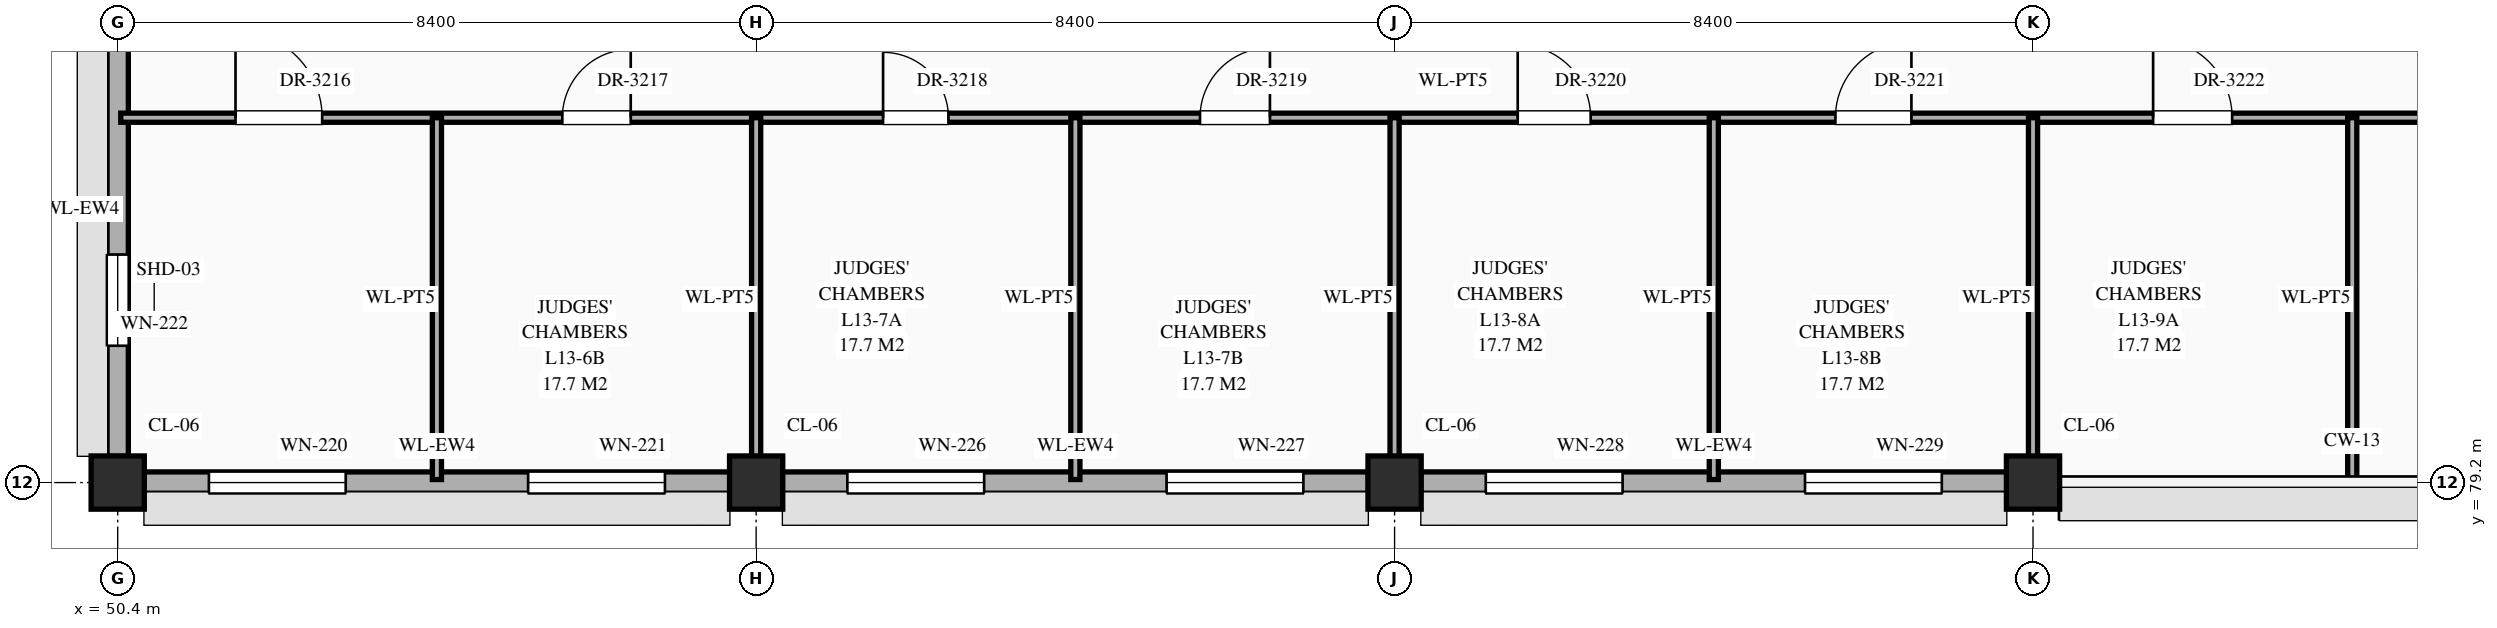
"""IFC4 building model, lengths in metres.
Left out: names, types, materials, properties, quantities, classifications, styles, units other than length and angle.
Written with IfcOpenShell. Run it as: python <this file> out.ifc"""

import sys

from ifc_helpers import new_model, si_unit, direction, frame, frame_2d, origin, origin_2d, place, context, subcontext, project, spatial, rectangle, extrude, element, fill, save


model = new_model("IFC4")
c1 = context("Model", 3, precision=1e-05, world=origin(), true_north=direction((0.0, 1.0)))
c2 = subcontext(c1, "Body", "Model", "MODEL_VIEW")
j1 = project(units=[si_unit("LENGTHUNIT", "METRE"), si_unit("PLANEANGLEUNIT", "RADIAN")], contexts=[c1])
p1 = place(None, origin())
s1 = spatial("IfcSite", under=j1, at=p1, CompositionType="ELEMENT")
p2 = place(p1, origin())
s2 = spatial("IfcBuilding", under=s1, at=p2, CompositionType="ELEMENT")
p3 = place(p2, frame((0.0, 0.0, 56.1)))
s3 = spatial("IfcBuildingStorey", under=s2, at=p3, CompositionType="ELEMENT", Elevation=56.1)
for number, where, z_axis, x_axis in (
    (1, (50.4, 79.2, 0.0), (0.0, 0.0, 1.0), (1.0, 0.0, 0.0)),
    (2, (58.8, 79.2, 0.0), (0.0, 0.0, 1.0), (1.0, 0.0, 0.0)),
    (3, (67.2, 79.2, 0.0), (0.0, 0.0, 1.0), (1.0, 0.0, 0.0)),
    (4, (75.6, 79.2, 0.0), (0.0, 0.0, 1.0), (1.0, 0.0, 0.0)),
):
    element("IfcColumn", number, at=place(p3, frame(where, z_axis=z_axis, x_axis=x_axis)), inside=s3, PredefinedType="COLUMN", context=c2, shape_type="SweptSolid", body=[
        extrude(rectangle(XDim=0.7, YDim=0.7, at=origin_2d()), origin(), (0.0, 0.0, 1.0), 4.2),
    ])
p4 = place(p3, frame((50.745, 79.2, 0.0), z_axis=(0.0, 0.0, 1.0), x_axis=(1.0, 0.0, 0.0)))
e5 = element("IfcWall", 5, at=p4, inside=s3, PredefinedType="STANDARD", context=c2, shape_type="SweptSolid", body=[
    extrude(rectangle(XDim=7.71, YDim=0.28, at=frame_2d((3.855, 0.0))), origin(), (0.0, 0.0, 1.0), 3.2),
])
p5 = place(p4, frame((0.855, 0.0, 0.55)))
e6 = element("IfcOpeningElement", 6, at=p5, cuts=e5, PredefinedType="OPENING", context=c2, shape_type="SweptSolid", body=[
    extrude(rectangle(XDim=1.8, YDim=2.12, at=frame_2d((0.9, 1.06))), frame((0.0, 0.152, 0.0), z_axis=(0.0, -1.0, 0.0), x_axis=(1.0, 0.0, 0.0)), (0.0, 0.0, 1.0), 0.304),
])
p6 = place(p4, frame((5.055, 0.0, 0.55)))
e7 = element("IfcOpeningElement", 7, at=p6, cuts=e5, PredefinedType="OPENING", context=c2, shape_type="SweptSolid", body=[
    extrude(rectangle(XDim=1.8, YDim=2.12, at=frame_2d((0.9, 1.06))), frame((0.0, 0.152, 0.0), z_axis=(0.0, -1.0, 0.0), x_axis=(1.0, 0.0, 0.0)), (0.0, 0.0, 1.0), 0.304),
])
p7 = place(p3, frame((50.4, 79.545, 0.0), z_axis=(0.0, 0.0, 1.0), x_axis=(0.0, 1.0, 0.0)))
e8 = element("IfcWall", 8, at=p7, inside=s3, PredefinedType="STANDARD", context=c2, shape_type="SweptSolid", body=[
    extrude(rectangle(XDim=6.51, YDim=0.28, at=frame_2d((3.255, 0.0))), origin(), (0.0, 0.0, 1.0), 3.2),
])
p8 = place(p7, frame((1.455, 0.0, 0.55)))
e9 = element("IfcOpeningElement", 9, at=p8, cuts=e8, PredefinedType="OPENING", context=c2, shape_type="SweptSolid", body=[
    extrude(rectangle(XDim=1.2, YDim=1.56, at=frame_2d((0.6, 0.78))), frame((0.0, 0.152, 0.0), z_axis=(0.0, -1.0, 0.0), x_axis=(1.0, 0.0, 0.0)), (0.0, 0.0, 1.0), 0.304),
])
p9 = place(p3, frame((59.145, 79.2, 0.0), z_axis=(0.0, 0.0, 1.0), x_axis=(1.0, 0.0, 0.0)))
e10 = element("IfcWall", 10, at=p9, inside=s3, PredefinedType="STANDARD", context=c2, shape_type="SweptSolid", body=[
    extrude(rectangle(XDim=7.71, YDim=0.28, at=frame_2d((3.855, 0.0))), origin(), (0.0, 0.0, 1.0), 3.31),
])
p10 = place(p9, frame((0.855, 0.0, 0.55)))
e11 = element("IfcOpeningElement", 11, at=p10, cuts=e10, PredefinedType="OPENING", context=c2, shape_type="SweptSolid", body=[
    extrude(rectangle(XDim=1.8, YDim=2.12, at=frame_2d((0.9, 1.06))), frame((0.0, 0.152, 0.0), z_axis=(0.0, -1.0, 0.0), x_axis=(1.0, 0.0, 0.0)), (0.0, 0.0, 1.0), 0.304),
])
p11 = place(p9, frame((5.055, 0.0, 0.55)))
e12 = element("IfcOpeningElement", 12, at=p11, cuts=e10, PredefinedType="OPENING", context=c2, shape_type="SweptSolid", body=[
    extrude(rectangle(XDim=1.8, YDim=2.12, at=frame_2d((0.9, 1.06))), frame((0.0, 0.152, 0.0), z_axis=(0.0, -1.0, 0.0), x_axis=(1.0, 0.0, 0.0)), (0.0, 0.0, 1.0), 0.304),
])
p12 = place(p3, frame((67.545, 79.2, 0.0), z_axis=(0.0, 0.0, 1.0), x_axis=(1.0, 0.0, 0.0)))
e13 = element("IfcWall", 13, at=p12, inside=s3, PredefinedType="STANDARD", context=c2, shape_type="SweptSolid", body=[
    extrude(rectangle(XDim=7.71, YDim=0.28, at=frame_2d((3.855, 0.0))), origin(), (0.0, 0.0, 1.0), 3.31),
])
p13 = place(p12, frame((0.855, 0.0, 0.55)))
e14 = element("IfcOpeningElement", 14, at=p13, cuts=e13, PredefinedType="OPENING", context=c2, shape_type="SweptSolid", body=[
    extrude(rectangle(XDim=1.8, YDim=2.12, at=frame_2d((0.9, 1.06))), frame((0.0, 0.152, 0.0), z_axis=(0.0, -1.0, 0.0), x_axis=(1.0, 0.0, 0.0)), (0.0, 0.0, 1.0), 0.304),
])
p14 = place(p12, frame((5.055, 0.0, 0.55)))
e15 = element("IfcOpeningElement", 15, at=p14, cuts=e13, PredefinedType="OPENING", context=c2, shape_type="SweptSolid", body=[
    extrude(rectangle(XDim=1.8, YDim=2.12, at=frame_2d((0.9, 1.06))), frame((0.0, 0.152, 0.0), z_axis=(0.0, -1.0, 0.0), x_axis=(1.0, 0.0, 0.0)), (0.0, 0.0, 1.0), 0.304),
])
p15 = place(p3, frame((50.44, 84.0, 0.0), z_axis=(0.0, 0.0, 1.0), x_axis=(1.0, 0.0, 0.0)))
e16 = element("IfcWall", 16, at=p15, inside=s3, PredefinedType="STANDARD", context=c2, shape_type="SweptSolid", body=[
    extrude(rectangle(XDim=67.12, YDim=0.12, at=frame_2d((33.56, 0.0))), origin(), (0.0, 0.0, 1.0), 3.96),
])
p16 = place(p15, frame((1.51, 0.0, 0.0)))
e17 = element("IfcOpeningElement", 17, at=p16, cuts=e16, PredefinedType="OPENING", context=c2, shape_type="SweptSolid", body=[
    extrude(rectangle(XDim=1.14, YDim=2.4, at=frame_2d((0.57, 1.2))), frame((0.0, 0.072, 0.0), z_axis=(0.0, -1.0, 0.0), x_axis=(1.0, 0.0, 0.0)), (0.0, 0.0, 1.0), 0.144),
])
p17 = place(p15, frame((5.81, 0.0, 0.0)))
e18 = element("IfcOpeningElement", 18, at=p17, cuts=e16, PredefinedType="OPENING", context=c2, shape_type="SweptSolid", body=[
    extrude(rectangle(XDim=0.9, YDim=2.15, at=frame_2d((0.45, 1.075))), frame((0.0, 0.072, 0.0), z_axis=(0.0, -1.0, 0.0), x_axis=(1.0, 0.0, 0.0)), (0.0, 0.0, 1.0), 0.144),
])
p18 = place(p15, frame((10.03, 0.0, 0.0)))
e19 = element("IfcOpeningElement", 19, at=p18, cuts=e16, PredefinedType="OPENING", context=c2, shape_type="SweptSolid", body=[
    extrude(rectangle(XDim=0.86, YDim=2.1, at=frame_2d((0.43, 1.05))), frame((0.0, 0.072, 0.0), z_axis=(0.0, -1.0, 0.0), x_axis=(1.0, 0.0, 0.0)), (0.0, 0.0, 1.0), 0.144),
])
p19 = place(p15, frame((14.2, 0.0, 0.0)))
e20 = element("IfcOpeningElement", 20, at=p19, cuts=e16, PredefinedType="OPENING", context=c2, shape_type="SweptSolid", body=[
    extrude(rectangle(XDim=0.92, YDim=2.15, at=frame_2d((0.46, 1.075))), frame((0.0, 0.072, 0.0), z_axis=(0.0, -1.0, 0.0), x_axis=(1.0, 0.0, 0.0)), (0.0, 0.0, 1.0), 0.144),
])
p20 = place(p15, frame((18.38, 0.0, 0.0)))
e21 = element("IfcOpeningElement", 21, at=p20, cuts=e16, PredefinedType="OPENING", context=c2, shape_type="SweptSolid", body=[
    extrude(rectangle(XDim=0.96, YDim=2.2, at=frame_2d((0.48, 1.1))), frame((0.0, 0.072, 0.0), z_axis=(0.0, -1.0, 0.0), x_axis=(1.0, 0.0, 0.0)), (0.0, 0.0, 1.0), 0.144),
])
p21 = place(p15, frame((22.56, 0.0, 0.0)))
e22 = element("IfcOpeningElement", 22, at=p21, cuts=e16, PredefinedType="OPENING", context=c2, shape_type="SweptSolid", body=[
    extrude(rectangle(XDim=1.0, YDim=2.25, at=frame_2d((0.5, 1.125))), frame((0.0, 0.072, 0.0), z_axis=(0.0, -1.0, 0.0), x_axis=(1.0, 0.0, 0.0)), (0.0, 0.0, 1.0), 0.144),
])
p22 = place(p15, frame((26.74, 0.0, 0.0)))
e23 = element("IfcOpeningElement", 23, at=p22, cuts=e16, PredefinedType="OPENING", context=c2, shape_type="SweptSolid", body=[
    extrude(rectangle(XDim=1.04, YDim=2.2, at=frame_2d((0.52, 1.1))), frame((0.0, 0.072, 0.0), z_axis=(0.0, -1.0, 0.0), x_axis=(1.0, 0.0, 0.0)), (0.0, 0.0, 1.0), 0.144),
])
p23 = place(p15, frame((30.92, 0.0, 0.0)))
e24 = element("IfcOpeningElement", 24, at=p23, cuts=e16, PredefinedType="OPENING", context=c2, shape_type="SweptSolid", body=[
    extrude(rectangle(XDim=1.08, YDim=2.25, at=frame_2d((0.54, 1.125))), frame((0.0, 0.072, 0.0), z_axis=(0.0, -1.0, 0.0), x_axis=(1.0, 0.0, 0.0)), (0.0, 0.0, 1.0), 0.144),
])
p24 = place(p15, frame((35.1, 0.0, 0.0)))
e25 = element("IfcOpeningElement", 25, at=p24, cuts=e16, PredefinedType="OPENING", context=c2, shape_type="SweptSolid", body=[
    extrude(rectangle(XDim=1.12, YDim=2.25, at=frame_2d((0.56, 1.125))), frame((0.0, 0.072, 0.0), z_axis=(0.0, -1.0, 0.0), x_axis=(1.0, 0.0, 0.0)), (0.0, 0.0, 1.0), 0.144),
])
p25 = place(p15, frame((39.28, 0.0, 0.0)))
e26 = element("IfcOpeningElement", 26, at=p25, cuts=e16, PredefinedType="OPENING", context=c2, shape_type="SweptSolid", body=[
    extrude(rectangle(XDim=1.16, YDim=2.3, at=frame_2d((0.58, 1.15))), frame((0.0, 0.072, 0.0), z_axis=(0.0, -1.0, 0.0), x_axis=(1.0, 0.0, 0.0)), (0.0, 0.0, 1.0), 0.144),
])
p26 = place(p15, frame((43.46, 0.0, 0.0)))
e27 = element("IfcOpeningElement", 27, at=p26, cuts=e16, PredefinedType="OPENING", context=c2, shape_type="SweptSolid", body=[
    extrude(rectangle(XDim=1.2, YDim=2.35, at=frame_2d((0.6, 1.175))), frame((0.0, 0.072, 0.0), z_axis=(0.0, -1.0, 0.0), x_axis=(1.0, 0.0, 0.0)), (0.0, 0.0, 1.0), 0.144),
])
p27 = place(p15, frame((47.64, 0.0, 0.0)))
e28 = element("IfcOpeningElement", 28, at=p27, cuts=e16, PredefinedType="OPENING", context=c2, shape_type="SweptSolid", body=[
    extrude(rectangle(XDim=1.24, YDim=2.3, at=frame_2d((0.62, 1.15))), frame((0.0, 0.072, 0.0), z_axis=(0.0, -1.0, 0.0), x_axis=(1.0, 0.0, 0.0)), (0.0, 0.0, 1.0), 0.144),
])
p28 = place(p15, frame((51.82, 0.0, 0.0)))
e29 = element("IfcOpeningElement", 29, at=p28, cuts=e16, PredefinedType="OPENING", context=c2, shape_type="SweptSolid", body=[
    extrude(rectangle(XDim=1.28, YDim=2.35, at=frame_2d((0.64, 1.175))), frame((0.0, 0.072, 0.0), z_axis=(0.0, -1.0, 0.0), x_axis=(1.0, 0.0, 0.0)), (0.0, 0.0, 1.0), 0.144),
])
p29 = place(p15, frame((56.19, 0.0, 0.0)))
e30 = element("IfcOpeningElement", 30, at=p29, cuts=e16, PredefinedType="OPENING", context=c2, shape_type="SweptSolid", body=[
    extrude(rectangle(XDim=0.94, YDim=2.3, at=frame_2d((0.47, 1.15))), frame((0.0, 0.072, 0.0), z_axis=(0.0, -1.0, 0.0), x_axis=(1.0, 0.0, 0.0)), (0.0, 0.0, 1.0), 0.144),
])
p30 = place(p15, frame((60.37, 0.0, 0.0)))
e31 = element("IfcOpeningElement", 31, at=p30, cuts=e16, PredefinedType="OPENING", context=c2, shape_type="SweptSolid", body=[
    extrude(rectangle(XDim=0.98, YDim=2.35, at=frame_2d((0.49, 1.175))), frame((0.0, 0.072, 0.0), z_axis=(0.0, -1.0, 0.0), x_axis=(1.0, 0.0, 0.0)), (0.0, 0.0, 1.0), 0.144),
])
p31 = place(p15, frame((64.53, 0.0, 0.0)))
e32 = element("IfcOpeningElement", 32, at=p31, cuts=e16, PredefinedType="OPENING", context=c2, shape_type="SweptSolid", body=[
    extrude(rectangle(XDim=1.02, YDim=2.4, at=frame_2d((0.51, 1.2))), frame((0.0, 0.072, 0.0), z_axis=(0.0, -1.0, 0.0), x_axis=(1.0, 0.0, 0.0)), (0.0, 0.0, 1.0), 0.144),
])
p32 = place(p3, frame((54.6, 79.24, 0.0), z_axis=(0.0, 0.0, 1.0), x_axis=(0.0, 1.0, 0.0)))
e33 = element("IfcWall", 33, at=p32, inside=s3, PredefinedType="STANDARD", context=c2, shape_type="SweptSolid", body=[
    extrude(rectangle(XDim=4.76, YDim=0.12, at=frame_2d((2.38, 0.0))), origin(), (0.0, 0.0, 1.0), 3.85),
])
p33 = place(p3, frame((58.8, 79.24, 0.0), z_axis=(0.0, 0.0, 1.0), x_axis=(0.0, 1.0, 0.0)))
e34 = element("IfcWall", 34, at=p33, inside=s3, PredefinedType="STANDARD", context=c2, shape_type="SweptSolid", body=[
    extrude(rectangle(XDim=4.76, YDim=0.12, at=frame_2d((2.38, 0.0))), origin(), (0.0, 0.0, 1.0), 3.1),
])
p34 = place(p3, frame((63.0, 79.24, 0.0), z_axis=(0.0, 0.0, 1.0), x_axis=(0.0, 1.0, 0.0)))
e35 = element("IfcWall", 35, at=p34, inside=s3, PredefinedType="STANDARD", context=c2, shape_type="SweptSolid", body=[
    extrude(rectangle(XDim=4.76, YDim=0.12, at=frame_2d((2.38, 0.0))), origin(), (0.0, 0.0, 1.0), 3.61),
])
p35 = place(p3, frame((67.2, 79.24, 0.0), z_axis=(0.0, 0.0, 1.0), x_axis=(0.0, 1.0, 0.0)))
e36 = element("IfcWall", 36, at=p35, inside=s3, PredefinedType="STANDARD", context=c2, shape_type="SweptSolid", body=[
    extrude(rectangle(XDim=4.76, YDim=0.12, at=frame_2d((2.38, 0.0))), origin(), (0.0, 0.0, 1.0), 3.21),
])
p36 = place(p3, frame((71.4, 79.24, 0.0), z_axis=(0.0, 0.0, 1.0), x_axis=(0.0, 1.0, 0.0)))
e37 = element("IfcWall", 37, at=p36, inside=s3, PredefinedType="STANDARD", context=c2, shape_type="SweptSolid", body=[
    extrude(rectangle(XDim=4.76, YDim=0.12, at=frame_2d((2.38, 0.0))), origin(), (0.0, 0.0, 1.0), 3.96),
])
p37 = place(p3, frame((75.6, 79.24, 0.0), z_axis=(0.0, 0.0, 1.0), x_axis=(0.0, 1.0, 0.0)))
e38 = element("IfcWall", 38, at=p37, inside=s3, PredefinedType="STANDARD", context=c2, shape_type="SweptSolid", body=[
    extrude(rectangle(XDim=4.76, YDim=0.12, at=frame_2d((2.38, 0.0))), origin(), (0.0, 0.0, 1.0), 3.21),
])
p38 = place(p3, frame((79.8, 79.24, 0.0), z_axis=(0.0, 0.0, 1.0), x_axis=(0.0, 1.0, 0.0)))
e39 = element("IfcWall", 39, at=p38, inside=s3, PredefinedType="STANDARD", context=c2, shape_type="SweptSolid", body=[
    extrude(rectangle(XDim=4.76, YDim=0.12, at=frame_2d((2.38, 0.0))), origin(), (0.0, 0.0, 1.0), 3.61),
])
p39 = place(p5, origin())
e40 = element("IfcWindow", 40, at=p39, inside=s3, PartitioningType="SINGLE_PANEL", PredefinedType="WINDOW", context=c2, shape_type="SweptSolid", body=[
    extrude(rectangle(XDim=1.8, YDim=2.12, at=frame_2d((0.9, 1.06))), frame((0.0, 0.03, 0.0), z_axis=(0.0, -1.0, 0.0), x_axis=(1.0, 0.0, 0.0)), (0.0, 0.0, 1.0), 0.06),
])
fill(e6, e40)
p40 = place(p6, origin())
e41 = element("IfcWindow", 41, at=p40, inside=s3, PartitioningType="SINGLE_PANEL", PredefinedType="WINDOW", context=c2, shape_type="SweptSolid", body=[
    extrude(rectangle(XDim=1.8, YDim=2.12, at=frame_2d((0.9, 1.06))), frame((0.0, 0.03, 0.0), z_axis=(0.0, -1.0, 0.0), x_axis=(1.0, 0.0, 0.0)), (0.0, 0.0, 1.0), 0.06),
])
fill(e7, e41)
p41 = place(p8, origin())
e42 = element("IfcWindow", 42, at=p41, inside=s3, PartitioningType="SINGLE_PANEL", PredefinedType="WINDOW", context=c2, shape_type="SweptSolid", body=[
    extrude(rectangle(XDim=1.2, YDim=1.56, at=frame_2d((0.6, 0.78))), frame((0.0, 0.03, 0.0), z_axis=(0.0, -1.0, 0.0), x_axis=(1.0, 0.0, 0.0)), (0.0, 0.0, 1.0), 0.06),
])
fill(e9, e42)
p42 = place(p10, origin())
e43 = element("IfcWindow", 43, at=p42, inside=s3, PartitioningType="SINGLE_PANEL", PredefinedType="WINDOW", context=c2, shape_type="SweptSolid", body=[
    extrude(rectangle(XDim=1.8, YDim=2.12, at=frame_2d((0.9, 1.06))), frame((0.0, 0.03, 0.0), z_axis=(0.0, -1.0, 0.0), x_axis=(1.0, 0.0, 0.0)), (0.0, 0.0, 1.0), 0.06),
])
fill(e11, e43)
p43 = place(p11, origin())
e44 = element("IfcWindow", 44, at=p43, inside=s3, PartitioningType="SINGLE_PANEL", PredefinedType="WINDOW", context=c2, shape_type="SweptSolid", body=[
    extrude(rectangle(XDim=1.8, YDim=2.12, at=frame_2d((0.9, 1.06))), frame((0.0, 0.03, 0.0), z_axis=(0.0, -1.0, 0.0), x_axis=(1.0, 0.0, 0.0)), (0.0, 0.0, 1.0), 0.06),
])
fill(e12, e44)
p44 = place(p13, origin())
e45 = element("IfcWindow", 45, at=p44, inside=s3, PartitioningType="SINGLE_PANEL", PredefinedType="WINDOW", context=c2, shape_type="SweptSolid", body=[
    extrude(rectangle(XDim=1.8, YDim=2.12, at=frame_2d((0.9, 1.06))), frame((0.0, 0.03, 0.0), z_axis=(0.0, -1.0, 0.0), x_axis=(1.0, 0.0, 0.0)), (0.0, 0.0, 1.0), 0.06),
])
fill(e14, e45)
p45 = place(p14, origin())
e46 = element("IfcWindow", 46, at=p45, inside=s3, PartitioningType="SINGLE_PANEL", PredefinedType="WINDOW", context=c2, shape_type="SweptSolid", body=[
    extrude(rectangle(XDim=1.8, YDim=2.12, at=frame_2d((0.9, 1.06))), frame((0.0, 0.03, 0.0), z_axis=(0.0, -1.0, 0.0), x_axis=(1.0, 0.0, 0.0)), (0.0, 0.0, 1.0), 0.06),
])
fill(e15, e46)
p46 = place(p16, origin())
e47 = element("IfcDoor", 47, at=p46, inside=s3, OperationType="SINGLE_SWING_LEFT", PredefinedType="DOOR", context=c2, shape_type="SweptSolid", body=[
    extrude(rectangle(XDim=1.14, YDim=2.4, at=frame_2d((0.57, 1.2))), frame((0.0, 0.025, 0.0), z_axis=(0.0, -1.0, 0.0), x_axis=(1.0, 0.0, 0.0)), (0.0, 0.0, 1.0), 0.05),
])
fill(e17, e47)
p47 = place(p17, origin())
e48 = element("IfcDoor", 48, at=p47, inside=s3, OperationType="SINGLE_SWING_RIGHT", PredefinedType="DOOR", context=c2, shape_type="SweptSolid", body=[
    extrude(rectangle(XDim=0.9, YDim=2.15, at=frame_2d((0.45, 1.075))), frame((0.0, 0.025, 0.0), z_axis=(0.0, -1.0, 0.0), x_axis=(1.0, 0.0, 0.0)), (0.0, 0.0, 1.0), 0.05),
])
fill(e18, e48)
p48 = place(p18, origin())
e49 = element("IfcDoor", 49, at=p48, inside=s3, OperationType="SINGLE_SWING_LEFT", PredefinedType="DOOR", context=c2, shape_type="SweptSolid", body=[
    extrude(rectangle(XDim=0.86, YDim=2.1, at=frame_2d((0.43, 1.05))), frame((0.0, 0.025, 0.0), z_axis=(0.0, -1.0, 0.0), x_axis=(1.0, 0.0, 0.0)), (0.0, 0.0, 1.0), 0.05),
])
fill(e19, e49)
p49 = place(p19, origin())
e50 = element("IfcDoor", 50, at=p49, inside=s3, OperationType="SINGLE_SWING_RIGHT", PredefinedType="DOOR", context=c2, shape_type="SweptSolid", body=[
    extrude(rectangle(XDim=0.92, YDim=2.15, at=frame_2d((0.46, 1.075))), frame((0.0, 0.025, 0.0), z_axis=(0.0, -1.0, 0.0), x_axis=(1.0, 0.0, 0.0)), (0.0, 0.0, 1.0), 0.05),
])
fill(e20, e50)
p50 = place(p20, origin())
e51 = element("IfcDoor", 51, at=p50, inside=s3, OperationType="SINGLE_SWING_LEFT", PredefinedType="DOOR", context=c2, shape_type="SweptSolid", body=[
    extrude(rectangle(XDim=0.96, YDim=2.2, at=frame_2d((0.48, 1.1))), frame((0.0, 0.025, 0.0), z_axis=(0.0, -1.0, 0.0), x_axis=(1.0, 0.0, 0.0)), (0.0, 0.0, 1.0), 0.05),
])
fill(e21, e51)
p51 = place(p21, origin())
e52 = element("IfcDoor", 52, at=p51, inside=s3, OperationType="SINGLE_SWING_RIGHT", PredefinedType="DOOR", context=c2, shape_type="SweptSolid", body=[
    extrude(rectangle(XDim=1.0, YDim=2.25, at=frame_2d((0.5, 1.125))), frame((0.0, 0.025, 0.0), z_axis=(0.0, -1.0, 0.0), x_axis=(1.0, 0.0, 0.0)), (0.0, 0.0, 1.0), 0.05),
])
fill(e22, e52)
p52 = place(p22, origin())
e53 = element("IfcDoor", 53, at=p52, inside=s3, OperationType="SINGLE_SWING_LEFT", PredefinedType="DOOR", context=c2, shape_type="SweptSolid", body=[
    extrude(rectangle(XDim=1.04, YDim=2.2, at=frame_2d((0.52, 1.1))), frame((0.0, 0.025, 0.0), z_axis=(0.0, -1.0, 0.0), x_axis=(1.0, 0.0, 0.0)), (0.0, 0.0, 1.0), 0.05),
])
fill(e23, e53)
save(model, sys.argv[1])
